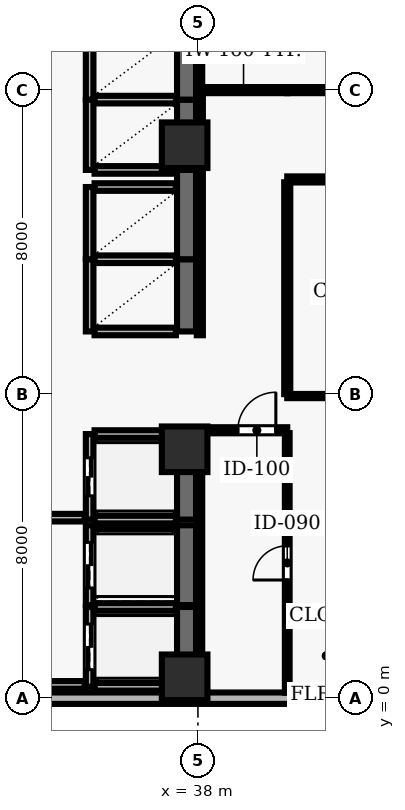
"""IFC4 building model, lengths in metres.
Left out: names, types, materials, properties, quantities, classifications, styles, units other than length and angle.
Written with IfcOpenShell. Run it as: python <this file> out.ifc"""

import sys

from ifc_helpers import new_model, si_unit, direction, frame, frame_2d, origin, origin_2d, place, context, subcontext, project, spatial, rectangle, extrude, element, fill, save


model = new_model("IFC4")
c1 = context("Model", 3, precision=1e-05, world=origin(), true_north=direction((0.0, 1.0)))
c2 = subcontext(c1, "Body", "Model", "MODEL_VIEW")
j1 = project(units=[si_unit("LENGTHUNIT", "METRE"), si_unit("PLANEANGLEUNIT", "RADIAN")], contexts=[c1])
p1 = place(None, origin())
s1 = spatial("IfcSite", under=j1, at=p1, CompositionType="ELEMENT")
p2 = place(p1, origin())
s2 = spatial("IfcBuilding", under=s1, at=p2, CompositionType="ELEMENT")
p3 = place(p2, frame((0.0, 0.0, 161.9)))
s3 = spatial("IfcBuildingStorey", under=s2, at=p3, CompositionType="ELEMENT", Elevation=161.9)
for number, where, z_axis, x_axis in (
    (1, (37.65, 0.55, 0.0), (0.0, 0.0, 1.0), (1.0, 0.0, 0.0)),
    (2, (37.65, 6.55, 0.0), (0.0, 0.0, 1.0), (1.0, 0.0, 0.0)),
    (3, (37.65, 14.55, 0.0), (0.0, 0.0, 1.0), (1.0, 0.0, 0.0)),
):
    element("IfcColumn", number, at=place(p3, frame(where, z_axis=z_axis, x_axis=x_axis)), inside=s3, PredefinedType="COLUMN", context=c2, shape_type="SweptSolid", body=[
        extrude(rectangle(XDim=1.2, YDim=1.2, at=origin_2d()), origin(), (0.0, 0.0, 1.0), 3.9),
    ])
p4 = place(p3, frame((24.5, 0.0, 0.0), z_axis=(0.0, 0.0, 1.0), x_axis=(1.0, 0.0, 0.0)))
e4 = element("IfcWall", 4, at=p4, inside=s3, PredefinedType="SOLIDWALL", context=c2, shape_type="SweptSolid", body=[
    extrude(rectangle(XDim=43.6, YDim=0.3, at=frame_2d((21.8, 0.0))), origin(), (0.0, 0.0, 1.0), 3.64),
])
p5 = place(p4, frame((1.675, 0.0, 0.9)))
e5 = element("IfcOpeningElement", 5, at=p5, cuts=e4, PredefinedType="OPENING", context=c2, shape_type="SweptSolid", body=[
    extrude(rectangle(XDim=2.1, YDim=1.6, at=frame_2d((1.05, 0.8))), frame((0.0, 0.16, 0.0), z_axis=(0.0, -1.0, 0.0), x_axis=(1.0, 0.0, 0.0)), (0.0, 0.0, 1.0), 0.32),
])
p6 = place(p4, frame((18.025, 0.0, 0.9)))
e6 = element("IfcOpeningElement", 6, at=p6, cuts=e4, PredefinedType="OPENING", context=c2, shape_type="SweptSolid", body=[
    extrude(rectangle(XDim=2.1, YDim=1.6, at=frame_2d((1.05, 0.8))), frame((0.0, 0.16, 0.0), z_axis=(0.0, -1.0, 0.0), x_axis=(1.0, 0.0, 0.0)), (0.0, 0.0, 1.0), 0.32),
])
p7 = place(p4, frame((24.375, 0.0, 0.9)))
e7 = element("IfcOpeningElement", 7, at=p7, cuts=e4, PredefinedType="OPENING", context=c2, shape_type="SweptSolid", body=[
    extrude(rectangle(XDim=2.1, YDim=1.6, at=frame_2d((1.05, 0.8))), frame((0.0, 0.16, 0.0), z_axis=(0.0, -1.0, 0.0), x_axis=(1.0, 0.0, 0.0)), (0.0, 0.0, 1.0), 0.32),
])
p8 = place(p4, frame((28.925, 0.0, 0.9)))
e8 = element("IfcOpeningElement", 8, at=p8, cuts=e4, PredefinedType="OPENING", context=c2, shape_type="SweptSolid", body=[
    extrude(rectangle(XDim=2.1, YDim=1.6, at=frame_2d((1.05, 0.8))), frame((0.0, 0.16, 0.0), z_axis=(0.0, -1.0, 0.0), x_axis=(1.0, 0.0, 0.0)), (0.0, 0.0, 1.0), 0.32),
])
p9 = place(p4, frame((34.375, 0.0, 0.9)))
e9 = element("IfcOpeningElement", 9, at=p9, cuts=e4, PredefinedType="OPENING", context=c2, shape_type="SweptSolid", body=[
    extrude(rectangle(XDim=2.1, YDim=1.6, at=frame_2d((1.05, 0.8))), frame((0.0, 0.16, 0.0), z_axis=(0.0, -1.0, 0.0), x_axis=(1.0, 0.0, 0.0)), (0.0, 0.0, 1.0), 0.32),
])
p10 = place(p4, frame((39.825, 0.0, 0.9)))
e10 = element("IfcOpeningElement", 10, at=p10, cuts=e4, PredefinedType="OPENING", context=c2, shape_type="SweptSolid", body=[
    extrude(rectangle(XDim=2.1, YDim=1.6, at=frame_2d((1.05, 0.8))), frame((0.0, 0.16, 0.0), z_axis=(0.0, -1.0, 0.0), x_axis=(1.0, 0.0, 0.0)), (0.0, 0.0, 1.0), 0.32),
])
p11 = place(p3, frame((35.15, 2.4, 0.0), z_axis=(0.0, 0.0, 1.0), x_axis=(0.0, -1.0, 0.0)))
e11 = element("IfcWall", 11, at=p11, inside=s3, PredefinedType="SOLIDWALL", context=c2, shape_type="SweptSolid", body=[
    extrude(rectangle(XDim=2.1, YDim=0.2, at=frame_2d((1.05, 0.0))), origin(), (0.0, 0.0, 1.0), 3.64),
])
p12 = place(p11, frame((0.45, 0.0, 0.0)))
e12 = element("IfcOpeningElement", 12, at=p12, cuts=e11, PredefinedType="OPENING", context=c2, shape_type="SweptSolid", body=[
    extrude(rectangle(XDim=1.2, YDim=2.15, at=frame_2d((0.6, 1.075))), frame((0.0, 0.11, 0.0), z_axis=(0.0, -1.0, 0.0), x_axis=(1.0, 0.0, 0.0)), (0.0, 0.0, 1.0), 0.22),
])
p13 = place(p3, frame((37.7, 0.3, 0.0), z_axis=(0.0, 0.0, 1.0), x_axis=(0.0, 1.0, 0.0)))
e13 = element("IfcWall", 13, at=p13, inside=s3, PredefinedType="SHEAR", context=c2, shape_type="SweptSolid", body=[
    extrude(rectangle(XDim=2.1, YDim=0.5, at=frame_2d((1.05, 0.0))), origin(), (0.0, 0.0, 1.0), 3.64),
])
for number, where, z_axis, x_axis in (
    (14, (35.28, 0.3, 0.0), (0.0, 0.0, 1.0), (1.0, 0.0, 0.0)),
    (15, (37.42, 2.4, 0.0), (0.0, 0.0, 1.0), (-1.0, 0.0, 0.0)),
):
    element("IfcWall", number, at=place(p3, frame(where, z_axis=z_axis, x_axis=x_axis)), inside=s3, PredefinedType="SOLIDWALL", context=c2, shape_type="SweptSolid", body=[
        extrude(rectangle(XDim=2.14, YDim=0.2, at=frame_2d((1.07, 0.0))), origin(), (0.0, 0.0, 1.0), 3.64),
    ])
p14 = place(p3, frame((35.15, 4.55, 0.0), z_axis=(0.0, 0.0, 1.0), x_axis=(0.0, -1.0, 0.0)))
e16 = element("IfcWall", 16, at=p14, inside=s3, PredefinedType="SOLIDWALL", context=c2, shape_type="SweptSolid", body=[
    extrude(rectangle(XDim=2.1, YDim=0.2, at=frame_2d((1.05, 0.0))), origin(), (0.0, 0.0, 1.0), 3.64),
])
p15 = place(p14, frame((0.45, 0.0, 0.0)))
e17 = element("IfcOpeningElement", 17, at=p15, cuts=e16, PredefinedType="OPENING", context=c2, shape_type="SweptSolid", body=[
    extrude(rectangle(XDim=1.2, YDim=2.15, at=frame_2d((0.6, 1.075))), frame((0.0, 0.11, 0.0), z_axis=(0.0, -1.0, 0.0), x_axis=(1.0, 0.0, 0.0)), (0.0, 0.0, 1.0), 0.22),
])
p16 = place(p3, frame((37.7, 2.45, 0.0), z_axis=(0.0, 0.0, 1.0), x_axis=(0.0, 1.0, 0.0)))
e18 = element("IfcWall", 18, at=p16, inside=s3, PredefinedType="SHEAR", context=c2, shape_type="SweptSolid", body=[
    extrude(rectangle(XDim=2.1, YDim=0.5, at=frame_2d((1.05, 0.0))), origin(), (0.0, 0.0, 1.0), 3.64),
])
p17 = place(p3, frame((37.42, 4.55, 0.0), z_axis=(0.0, 0.0, 1.0), x_axis=(-1.0, 0.0, 0.0)))
e19 = element("IfcWall", 19, at=p17, inside=s3, PredefinedType="SOLIDWALL", context=c2, shape_type="SweptSolid", body=[
    extrude(rectangle(XDim=2.14, YDim=0.2, at=frame_2d((1.07, 0.0))), origin(), (0.0, 0.0, 1.0), 3.64),
])
p18 = place(p3, frame((35.15, 6.95, 0.0), z_axis=(0.0, 0.0, 1.0), x_axis=(0.0, -1.0, 0.0)))
e20 = element("IfcWall", 20, at=p18, inside=s3, PredefinedType="SOLIDWALL", context=c2, shape_type="SweptSolid", body=[
    extrude(rectangle(XDim=2.25, YDim=0.2, at=frame_2d((1.125, 0.0))), origin(), (0.0, 0.0, 1.0), 3.64),
])
p19 = place(p18, frame((0.625, 0.0, 0.0)))
e21 = element("IfcOpeningElement", 21, at=p19, cuts=e20, PredefinedType="OPENING", context=c2, shape_type="SweptSolid", body=[
    extrude(rectangle(XDim=1.0, YDim=2.1, at=frame_2d((0.5, 1.05))), frame((0.0, 0.11, 0.0), z_axis=(0.0, -1.0, 0.0), x_axis=(1.0, 0.0, 0.0)), (0.0, 0.0, 1.0), 0.22),
])
p20 = place(p3, frame((37.7, 4.7, 0.0), z_axis=(0.0, 0.0, 1.0), x_axis=(0.0, 1.0, 0.0)))
e22 = element("IfcWall", 22, at=p20, inside=s3, PredefinedType="SHEAR", context=c2, shape_type="SweptSolid", body=[
    extrude(rectangle(XDim=2.25, YDim=0.5, at=frame_2d((1.125, 0.0))), origin(), (0.0, 0.0, 1.0), 3.64),
])
for number, where, z_axis, x_axis in (
    (23, (35.28, 4.7, 0.0), (0.0, 0.0, 1.0), (1.0, 0.0, 0.0)),
    (24, (37.42, 6.95, 0.0), (0.0, 0.0, 1.0), (-1.0, 0.0, 0.0)),
):
    element("IfcWall", number, at=place(p3, frame(where, z_axis=z_axis, x_axis=x_axis)), inside=s3, PredefinedType="SOLIDWALL", context=c2, shape_type="SweptSolid", body=[
        extrude(rectangle(XDim=2.14, YDim=0.2, at=frame_2d((1.07, 0.0))), origin(), (0.0, 0.0, 1.0), 3.64),
    ])
p21 = place(p3, frame((35.15, 11.55, 0.0), z_axis=(0.0, 0.0, 1.0), x_axis=(0.0, -1.0, 0.0)))
e25 = element("IfcWall", 25, at=p21, inside=s3, PredefinedType="SOLIDWALL", context=c2, shape_type="SweptSolid", body=[
    extrude(rectangle(XDim=1.9, YDim=0.2, at=frame_2d((0.95, 0.0))), origin(), (0.0, 0.0, 1.0), 3.64),
])
p22 = place(p3, frame((37.7, 9.65, 0.0), z_axis=(0.0, 0.0, 1.0), x_axis=(0.0, 1.0, 0.0)))
e26 = element("IfcWall", 26, at=p22, inside=s3, PredefinedType="SHEAR", context=c2, shape_type="SweptSolid", body=[
    extrude(rectangle(XDim=1.9, YDim=0.5, at=frame_2d((0.95, 0.0))), origin(), (0.0, 0.0, 1.0), 3.64),
])
for number, where, z_axis, x_axis in (
    (27, (35.28, 9.65, 0.0), (0.0, 0.0, 1.0), (1.0, 0.0, 0.0)),
    (28, (37.42, 11.55, 0.0), (0.0, 0.0, 1.0), (-1.0, 0.0, 0.0)),
):
    element("IfcWall", number, at=place(p3, frame(where, z_axis=z_axis, x_axis=x_axis)), inside=s3, PredefinedType="SOLIDWALL", context=c2, shape_type="SweptSolid", body=[
        extrude(rectangle(XDim=2.14, YDim=0.2, at=frame_2d((1.07, 0.0))), origin(), (0.0, 0.0, 1.0), 3.64),
    ])
p23 = place(p3, frame((35.15, 13.45, 0.0), z_axis=(0.0, 0.0, 1.0), x_axis=(0.0, -1.0, 0.0)))
e29 = element("IfcWall", 29, at=p23, inside=s3, PredefinedType="SOLIDWALL", context=c2, shape_type="SweptSolid", body=[
    extrude(rectangle(XDim=1.9, YDim=0.2, at=frame_2d((0.95, 0.0))), origin(), (0.0, 0.0, 1.0), 3.64),
])
p24 = place(p3, frame((37.7, 11.55, 0.0), z_axis=(0.0, 0.0, 1.0), x_axis=(0.0, 1.0, 0.0)))
e30 = element("IfcWall", 30, at=p24, inside=s3, PredefinedType="SHEAR", context=c2, shape_type="SweptSolid", body=[
    extrude(rectangle(XDim=2.35, YDim=0.5, at=frame_2d((1.175, 0.0))), origin(), (0.0, 0.0, 1.0), 3.64),
])
p25 = place(p3, frame((37.42, 13.45, 0.0), z_axis=(0.0, 0.0, 1.0), x_axis=(-1.0, 0.0, 0.0)))
e31 = element("IfcWall", 31, at=p25, inside=s3, PredefinedType="SOLIDWALL", context=c2, shape_type="SweptSolid", body=[
    extrude(rectangle(XDim=2.14, YDim=0.2, at=frame_2d((1.07, 0.0))), origin(), (0.0, 0.0, 1.0), 3.64),
])
p26 = place(p3, frame((35.15, 15.75, 0.0), z_axis=(0.0, 0.0, 1.0), x_axis=(0.0, -1.0, 0.0)))
e32 = element("IfcWall", 32, at=p26, inside=s3, PredefinedType="SOLIDWALL", context=c2, shape_type="SweptSolid", body=[
    extrude(rectangle(XDim=1.85, YDim=0.2, at=frame_2d((0.925, 0.0))), origin(), (0.0, 0.0, 1.0), 3.64),
])
p27 = place(p3, frame((37.7, 13.9, 0.0), z_axis=(0.0, 0.0, 1.0), x_axis=(0.0, 1.0, 0.0)))
e33 = element("IfcWall", 33, at=p27, inside=s3, PredefinedType="SHEAR", context=c2, shape_type="SweptSolid", body=[
    extrude(rectangle(XDim=1.85, YDim=0.5, at=frame_2d((0.925, 0.0))), origin(), (0.0, 0.0, 1.0), 3.64),
])
for number, where, z_axis, x_axis in (
    (34, (35.28, 13.9, 0.0), (0.0, 0.0, 1.0), (1.0, 0.0, 0.0)),
    (35, (37.42, 15.75, 0.0), (0.0, 0.0, 1.0), (-1.0, 0.0, 0.0)),
):
    element("IfcWall", number, at=place(p3, frame(where, z_axis=z_axis, x_axis=x_axis)), inside=s3, PredefinedType="SOLIDWALL", context=c2, shape_type="SweptSolid", body=[
        extrude(rectangle(XDim=2.14, YDim=0.2, at=frame_2d((1.07, 0.0))), origin(), (0.0, 0.0, 1.0), 3.64),
    ])
p28 = place(p3, frame((35.15, 17.6, 0.0), z_axis=(0.0, 0.0, 1.0), x_axis=(0.0, -1.0, 0.0)))
e36 = element("IfcWall", 36, at=p28, inside=s3, PredefinedType="SOLIDWALL", context=c2, shape_type="SweptSolid", body=[
    extrude(rectangle(XDim=1.85, YDim=0.2, at=frame_2d((0.925, 0.0))), origin(), (0.0, 0.0, 1.0), 3.64),
])
p29 = place(p3, frame((37.7, 15.75, 0.0), z_axis=(0.0, 0.0, 1.0), x_axis=(0.0, 1.0, 0.0)))
e37 = element("IfcWall", 37, at=p29, inside=s3, PredefinedType="SHEAR", context=c2, shape_type="SweptSolid", body=[
    extrude(rectangle(XDim=1.85, YDim=0.5, at=frame_2d((0.925, 0.0))), origin(), (0.0, 0.0, 1.0), 3.64),
])
p30 = place(p3, frame((31.65, 0.35, 0.0), z_axis=(0.0, 0.0, 1.0), x_axis=(1.0, 0.0, 0.0)))
e38 = element("IfcWall", 38, at=p30, inside=s3, PredefinedType="SOLIDWALL", context=c2, shape_type="SweptSolid", body=[
    extrude(rectangle(XDim=3.37, YDim=0.2, at=frame_2d((1.685, 0.0))), origin(), (0.0, 0.0, 1.0), 3.64),
])
p31 = place(p3, frame((35.02, 4.75, 0.0), z_axis=(0.0, 0.0, 1.0), x_axis=(-1.0, 0.0, 0.0)))
e39 = element("IfcWall", 39, at=p31, inside=s3, PredefinedType="SOLIDWALL", context=c2, shape_type="SweptSolid", body=[
    extrude(rectangle(XDim=3.11, YDim=0.2, at=frame_2d((1.555, 0.0))), origin(), (0.0, 0.0, 1.0), 3.64),
])
p32 = place(p31, frame((1.03, 0.0, 0.0)))
e40 = element("IfcOpeningElement", 40, at=p32, cuts=e39, PredefinedType="OPENING", context=c2, shape_type="SweptSolid", body=[
    extrude(rectangle(XDim=1.05, YDim=2.15, at=frame_2d((0.525, 1.075))), frame((0.0, 0.11, 0.0), z_axis=(0.0, -1.0, 0.0), x_axis=(1.0, 0.0, 0.0)), (0.0, 0.0, 1.0), 0.22),
])
p33 = place(p3, frame((38.05, 7.05, 0.0), z_axis=(0.0, 0.0, 1.0), x_axis=(1.0, 0.0, 0.0)))
e41 = element("IfcWall", 41, at=p33, inside=s3, PredefinedType="PARTITIONING", context=c2, shape_type="SweptSolid", body=[
    extrude(rectangle(XDim=2.3, YDim=0.16, at=frame_2d((1.15, 0.0))), origin(), (0.0, 0.0, 1.0), 3.64),
])
p34 = place(p33, frame((1.0, 0.0, 0.0)))
e42 = element("IfcOpeningElement", 42, at=p34, cuts=e41, PredefinedType="OPENING", context=c2, shape_type="SweptSolid", body=[
    extrude(rectangle(XDim=1.0, YDim=2.1, at=frame_2d((0.5, 1.05))), frame((0.0, 0.09, 0.0), z_axis=(0.0, -1.0, 0.0), x_axis=(1.0, 0.0, 0.0)), (0.0, 0.0, 1.0), 0.18),
])
p35 = place(p3, frame((40.35, 13.65, 0.0), z_axis=(0.0, 0.0, 1.0), x_axis=(1.0, 0.0, 0.0)))
e43 = element("IfcWall", 43, at=p35, inside=s3, PredefinedType="PARTITIONING", context=c2, shape_type="SweptSolid", body=[
    extrude(rectangle(XDim=7.87, YDim=0.16, at=frame_2d((3.935, 0.0))), origin(), (0.0, 0.0, 1.0), 3.64),
])
p36 = place(p35, frame((3.435, 0.0, 0.0)))
e44 = element("IfcOpeningElement", 44, at=p36, cuts=e43, PredefinedType="OPENING", context=c2, shape_type="SweptSolid", body=[
    extrude(rectangle(XDim=1.0, YDim=2.1, at=frame_2d((0.5, 1.05))), frame((0.0, 0.09, 0.0), z_axis=(0.0, -1.0, 0.0), x_axis=(1.0, 0.0, 0.0)), (0.0, 0.0, 1.0), 0.18),
])
p37 = place(p3, frame((40.35, 16.0, 0.0), z_axis=(0.0, 0.0, 1.0), x_axis=(-1.0, 0.0, 0.0)))
e45 = element("IfcWall", 45, at=p37, inside=s3, PredefinedType="PARTITIONING", context=c2, shape_type="SweptSolid", body=[
    extrude(rectangle(XDim=2.3, YDim=0.16, at=frame_2d((1.15, 0.0))), origin(), (0.0, 0.0, 1.0), 3.64),
])
p38 = place(p3, frame((40.35, 16.0, 0.0), z_axis=(0.0, 0.0, 1.0), x_axis=(1.0, 0.0, 0.0)))
e46 = element("IfcWall", 46, at=p38, inside=s3, PredefinedType="PARTITIONING", context=c2, shape_type="SweptSolid", body=[
    extrude(rectangle(XDim=4.246, YDim=0.16, at=frame_2d((2.123, 0.0))), origin(), (0.0, 0.0, 1.0), 3.64),
])
p39 = place(p38, frame((1.673, 0.0, 0.0)))
e47 = element("IfcOpeningElement", 47, at=p39, cuts=e46, PredefinedType="OPENING", context=c2, shape_type="SweptSolid", body=[
    extrude(rectangle(XDim=0.9, YDim=2.1, at=frame_2d((0.45, 1.05))), frame((0.0, 0.09, 0.0), z_axis=(0.0, -1.0, 0.0), x_axis=(1.0, 0.0, 0.0)), (0.0, 0.0, 1.0), 0.18),
])
p40 = place(p3, frame((48.22, 7.95, 0.0), z_axis=(0.0, 0.0, 1.0), x_axis=(-1.0, 0.0, 0.0)))
e48 = element("IfcWall", 48, at=p40, inside=s3, PredefinedType="MOVABLE", context=c2, shape_type="SweptSolid", body=[
    extrude(rectangle(XDim=7.87, YDim=0.11, at=frame_2d((3.935, 0.0))), origin(), (0.0, 0.0, 1.0), 3.023),
])
p41 = place(p3, frame((38.05, 6.975, 0.0), z_axis=(0.0, 0.0, 1.0), x_axis=(0.0, -1.0, 0.0)))
e49 = element("IfcWall", 49, at=p41, inside=s3, PredefinedType="PARTITIONING", context=c2, shape_type="SweptSolid", body=[
    extrude(rectangle(XDim=6.83, YDim=0.125, at=frame_2d((3.415, 0.0))), origin(), (0.0, 0.0, 1.0), 3.023),
])
p42 = place(p3, frame((38.05, 15.925, 0.0), z_axis=(0.0, 0.0, 1.0), x_axis=(0.0, -1.0, 0.0)))
e50 = element("IfcWall", 50, at=p42, inside=s3, PredefinedType="PARTITIONING", context=c2, shape_type="SweptSolid", body=[
    extrude(rectangle(XDim=6.375, YDim=0.16, at=frame_2d((3.188, 0.0))), origin(), (0.0, 0.0, 1.0), 3.023),
])
p43 = place(p3, frame((38.05, 21.955, 0.0), z_axis=(0.0, 0.0, 1.0), x_axis=(0.0, -1.0, 0.0)))
e51 = element("IfcWall", 51, at=p43, inside=s3, PredefinedType="PARTITIONING", context=c2, shape_type="SweptSolid", body=[
    extrude(rectangle(XDim=5.88, YDim=0.125, at=frame_2d((2.94, 0.0))), origin(), (0.0, 0.0, 1.0), 3.023),
])
p44 = place(p3, frame((40.35, 0.145, 0.0), z_axis=(0.0, 0.0, 1.0), x_axis=(0.0, 1.0, 0.0)))
e52 = element("IfcWall", 52, at=p44, inside=s3, PredefinedType="PARTITIONING", context=c2, shape_type="SweptSolid", body=[
    extrude(rectangle(XDim=6.83, YDim=0.125, at=frame_2d((3.415, 0.0))), origin(), (0.0, 0.0, 1.0), 3.64),
])
p45 = place(p44, frame((2.965, 0.0, 0.0)))
e53 = element("IfcOpeningElement", 53, at=p45, cuts=e52, PredefinedType="OPENING", context=c2, shape_type="SweptSolid", body=[
    extrude(rectangle(XDim=0.9, YDim=2.1, at=frame_2d((0.45, 1.05))), frame((0.0, 0.073, 0.0), z_axis=(0.0, -1.0, 0.0), x_axis=(1.0, 0.0, 0.0)), (0.0, 0.0, 1.0), 0.145),
])
p46 = place(p3, frame((40.35, 8.0, 0.0), z_axis=(0.0, 0.0, 1.0), x_axis=(0.0, 1.0, 0.0)))
e54 = element("IfcWall", 54, at=p46, inside=s3, PredefinedType="PARTITIONING", context=c2, shape_type="SweptSolid", body=[
    extrude(rectangle(XDim=5.575, YDim=0.16, at=frame_2d((2.788, 0.0))), origin(), (0.0, 0.0, 1.0), 3.64),
])
p47 = place(p12, origin())
e55 = element("IfcDoor", 55, at=p47, inside=s3, OperationType="DOUBLE_DOOR_SLIDING", PredefinedType="DOOR", context=c2, shape_type="SweptSolid", body=[
    extrude(rectangle(XDim=1.2, YDim=2.15, at=frame_2d((0.6, 1.075))), frame((0.0, 0.025, 0.0), z_axis=(0.0, -1.0, 0.0), x_axis=(1.0, 0.0, 0.0)), (0.0, 0.0, 1.0), 0.05),
])
fill(e12, e55)
p48 = place(p15, origin())
e56 = element("IfcDoor", 56, at=p48, inside=s3, OperationType="DOUBLE_DOOR_SLIDING", PredefinedType="DOOR", context=c2, shape_type="SweptSolid", body=[
    extrude(rectangle(XDim=1.2, YDim=2.15, at=frame_2d((0.6, 1.075))), frame((0.0, 0.025, 0.0), z_axis=(0.0, -1.0, 0.0), x_axis=(1.0, 0.0, 0.0)), (0.0, 0.0, 1.0), 0.05),
])
fill(e17, e56)
p49 = place(p19, origin())
e57 = element("IfcDoor", 57, at=p49, inside=s3, OperationType="DOUBLE_DOOR_SLIDING", PredefinedType="DOOR", context=c2, shape_type="SweptSolid", body=[
    extrude(rectangle(XDim=1.0, YDim=2.1, at=frame_2d((0.5, 1.05))), frame((0.0, 0.025, 0.0), z_axis=(0.0, -1.0, 0.0), x_axis=(1.0, 0.0, 0.0)), (0.0, 0.0, 1.0), 0.05),
])
fill(e21, e57)
p50 = place(p34, origin())
e58 = element("IfcDoor", 58, at=p50, inside=s3, OperationType="SINGLE_SWING_RIGHT", PredefinedType="DOOR", context=c2, shape_type="SweptSolid", body=[
    extrude(rectangle(XDim=1.0, YDim=2.1, at=frame_2d((0.5, 1.05))), frame((0.0, 0.025, 0.0), z_axis=(0.0, -1.0, 0.0), x_axis=(1.0, 0.0, 0.0)), (0.0, 0.0, 1.0), 0.05),
])
fill(e42, e58)
p51 = place(p45, origin())
e59 = element("IfcDoor", 59, at=p51, inside=s3, OperationType="SINGLE_SWING_LEFT", PredefinedType="DOOR", context=c2, shape_type="SweptSolid", body=[
    extrude(rectangle(XDim=0.9, YDim=2.1, at=frame_2d((0.45, 1.05))), frame((0.0, 0.025, 0.0), z_axis=(0.0, -1.0, 0.0), x_axis=(1.0, 0.0, 0.0)), (0.0, 0.0, 1.0), 0.05),
])
fill(e53, e59)
save(model, sys.argv[1])
